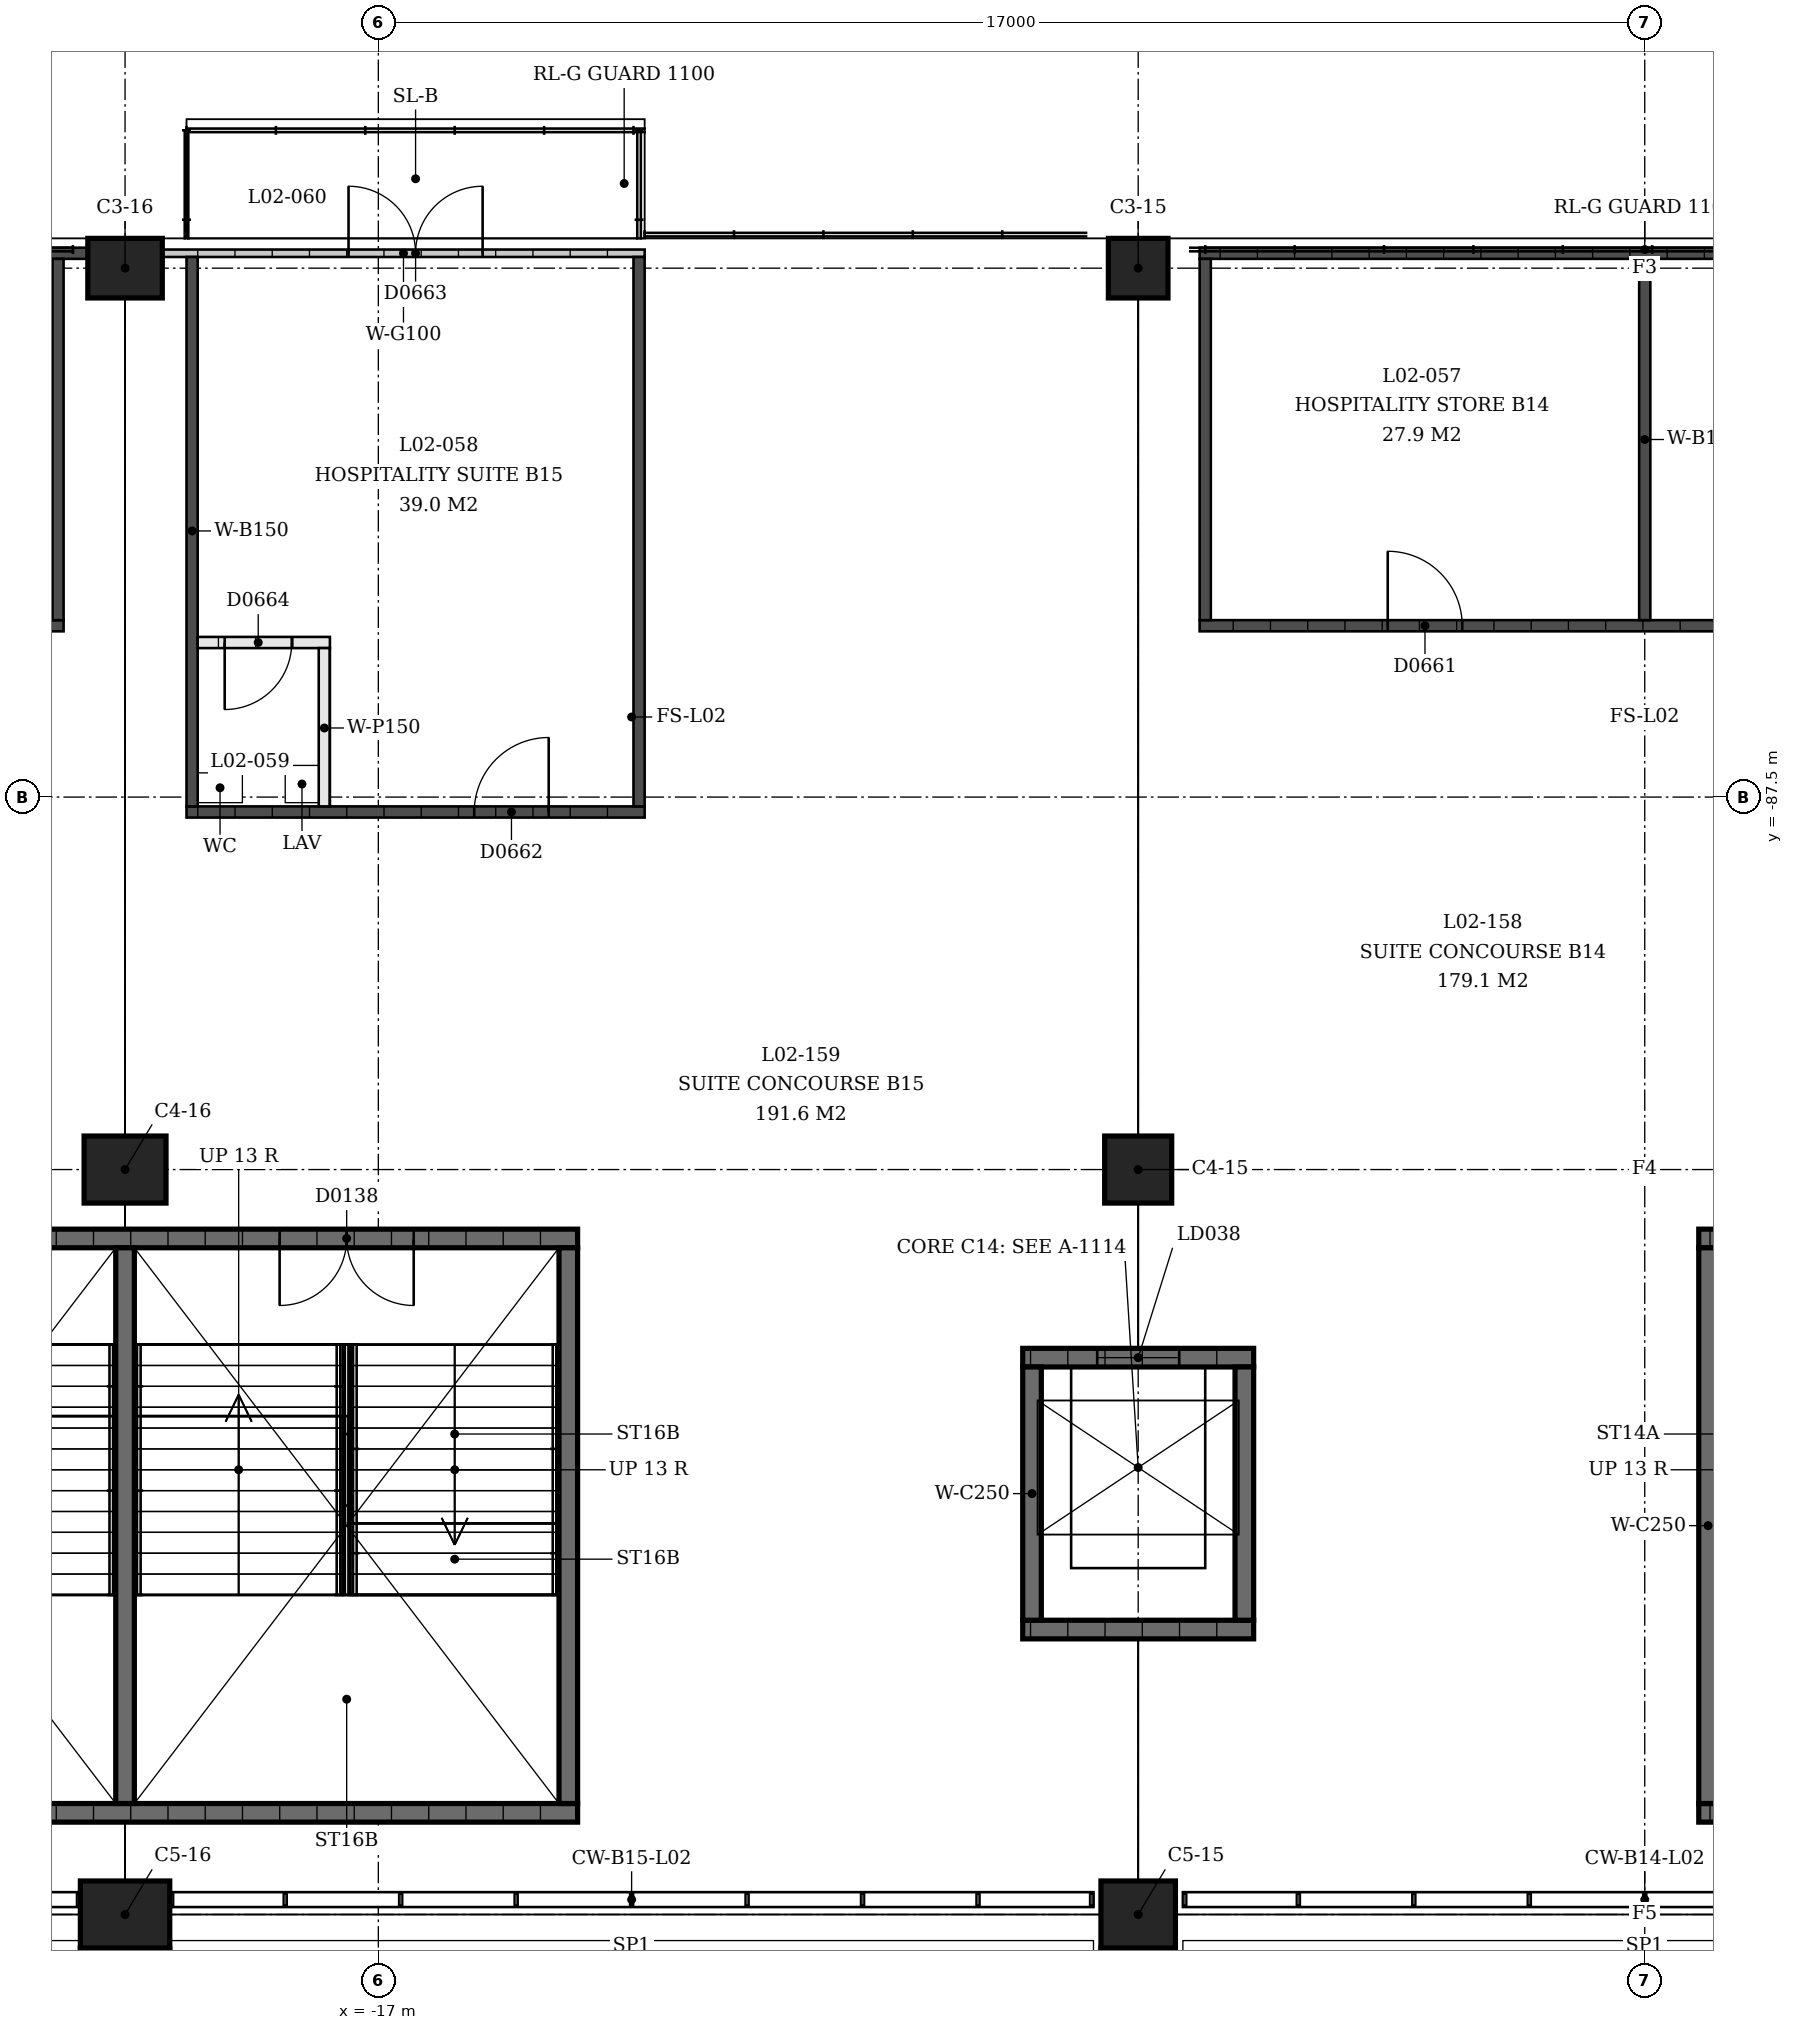
"""IFC4 building model, lengths in metres.
Left out: names, types, materials, properties, quantities, classifications, styles, units other than length and angle.
Written with IfcOpenShell. Run it as: python <this file> out.ifc"""

import sys

from ifc_helpers import new_model, si_unit, direction, frame, frame_2d, origin, origin_2d, place, context, subcontext, project, spatial, rectangle, extrude, element, fill, save


model = new_model("IFC4")
c1 = context("Model", 3, precision=1e-05, world=origin(), true_north=direction((0.0, 1.0)))
c2 = subcontext(c1, "Body", "Model", "MODEL_VIEW")
j1 = project(units=[si_unit("LENGTHUNIT", "METRE"), si_unit("PLANEANGLEUNIT", "RADIAN")], contexts=[c1])
p1 = place(None, origin())
s1 = spatial("IfcSite", under=j1, at=p1, CompositionType="ELEMENT")
p2 = place(p1, origin())
s2 = spatial("IfcBuilding", under=s1, at=p2, CompositionType="ELEMENT")
p3 = place(p2, frame((0.0, 0.0, 9.0)))
s3 = spatial("IfcBuildingStorey", under=s2, at=p3, CompositionType="ELEMENT", Elevation=9.0)
p4 = place(p3, frame((-6.8, -80.4, 0.0), z_axis=(0.0, 0.0, 1.0), x_axis=(1.0, 0.0, 0.0)))
e1 = element("IfcColumn", 1, at=p4, inside=s3, PredefinedType="COLUMN", context=c2, shape_type="SweptSolid", body=[
    extrude(rectangle(XDim=0.8, YDim=0.8, at=origin_2d()), origin(), (0.0, 0.0, 1.0), 4.5),
])
p5 = place(p3, frame((-6.8, -92.5, 0.0), z_axis=(0.0, 0.0, 1.0), x_axis=(1.0, 0.0, 0.0)))
e2 = element("IfcColumn", 2, at=p5, inside=s3, PredefinedType="COLUMN", context=c2, shape_type="SweptSolid", body=[
    extrude(rectangle(XDim=0.9, YDim=0.9, at=origin_2d()), origin(), (0.0, 0.0, 1.0), 4.5),
])
p6 = place(p3, frame((-6.8, -102.5, 0.0), z_axis=(0.0, 0.0, 1.0), x_axis=(1.0, 0.0, 0.0)))
e3 = element("IfcColumn", 3, at=p6, inside=s3, PredefinedType="COLUMN", context=c2, shape_type="SweptSolid", body=[
    extrude(rectangle(XDim=1.0, YDim=0.9, at=origin_2d()), origin(), (0.0, 0.0, 1.0), 4.5),
])
p7 = place(p3, frame((-20.4, -80.4, 0.0), z_axis=(0.0, 0.0, 1.0), x_axis=(1.0, 0.0, 0.0)))
e4 = element("IfcColumn", 4, at=p7, inside=s3, PredefinedType="COLUMN", context=c2, shape_type="SweptSolid", body=[
    extrude(rectangle(XDim=1.0, YDim=0.8, at=origin_2d()), origin(), (0.0, 0.0, 1.0), 4.5),
])
p8 = place(p3, frame((-20.4, -92.5, 0.0), z_axis=(0.0, 0.0, 1.0), x_axis=(1.0, 0.0, 0.0)))
e5 = element("IfcColumn", 5, at=p8, inside=s3, PredefinedType="COLUMN", context=c2, shape_type="SweptSolid", body=[
    extrude(rectangle(XDim=1.1, YDim=0.9, at=origin_2d()), origin(), (0.0, 0.0, 1.0), 4.5),
])
p9 = place(p3, frame((-20.4, -102.5, 0.0), z_axis=(0.0, 0.0, 1.0), x_axis=(1.0, 0.0, 0.0)))
e6 = element("IfcColumn", 6, at=p9, inside=s3, PredefinedType="COLUMN", context=c2, shape_type="SweptSolid", body=[
    extrude(rectangle(XDim=1.2, YDim=0.9, at=origin_2d()), origin(), (0.0, 0.0, 1.0), 4.5),
])
p10 = place(p3, frame((0.725, -93.425, 0.0), z_axis=(0.0, 0.0, 1.0), x_axis=(1.0, 0.0, 0.0)))
e7 = element("IfcWall", 7, at=p10, inside=s3, PredefinedType="SHEAR", context=c2, shape_type="SweptSolid", body=[
    extrude(rectangle(XDim=12.15, YDim=0.25, at=frame_2d((6.075, 0.0))), origin(), (0.0, 0.0, 1.0), 4.09),
])
p11 = place(p10, frame((2.2, 0.0, 0.0)))
e8 = element("IfcOpeningElement", 8, at=p11, cuts=e7, PredefinedType="OPENING", context=c2, shape_type="SweptSolid", body=[
    extrude(rectangle(XDim=1.8, YDim=2.1, at=frame_2d((0.9, 1.05))), frame((0.0, 0.125, 0.0), z_axis=(0.0, -1.0, 0.0), x_axis=(1.0, 0.0, 0.0)), (0.0, 0.0, 1.0), 0.25),
])
p12 = place(p10, frame((8.15, 0.0, 0.0)))
e9 = element("IfcOpeningElement", 9, at=p12, cuts=e7, PredefinedType="OPENING", context=c2, shape_type="SweptSolid", body=[
    extrude(rectangle(XDim=1.8, YDim=2.1, at=frame_2d((0.9, 1.05))), frame((0.0, 0.125, 0.0), z_axis=(0.0, -1.0, 0.0), x_axis=(1.0, 0.0, 0.0)), (0.0, 0.0, 1.0), 0.25),
])
p13 = place(p3, frame((0.725, -101.135, 0.0), z_axis=(0.0, 0.0, 1.0), x_axis=(1.0, 0.0, 0.0)))
e10 = element("IfcWall", 10, at=p13, inside=s3, PredefinedType="SHEAR", context=c2, shape_type="SweptSolid", body=[
    extrude(rectangle(XDim=12.15, YDim=0.25, at=frame_2d((6.075, 0.0))), origin(), (0.0, 0.0, 1.0), 4.09),
])
p14 = place(p3, frame((0.85, -93.55, 0.0), z_axis=(0.0, 0.0, 1.0), x_axis=(0.0, -1.0, 0.0)))
e11 = element("IfcWall", 11, at=p14, inside=s3, PredefinedType="SHEAR", context=c2, shape_type="SweptSolid", body=[
    extrude(rectangle(XDim=7.46, YDim=0.25, at=frame_2d((3.73, 0.0))), origin(), (0.0, 0.0, 1.0), 4.09),
])
p15 = place(p3, frame((-26.475, -93.425, 0.0), z_axis=(0.0, 0.0, 1.0), x_axis=(1.0, 0.0, 0.0)))
e12 = element("IfcWall", 12, at=p15, inside=s3, PredefinedType="SHEAR", context=c2, shape_type="SweptSolid", body=[
    extrude(rectangle(XDim=12.15, YDim=0.25, at=frame_2d((6.075, 0.0))), origin(), (0.0, 0.0, 1.0), 4.09),
])
p16 = place(p15, frame((2.2, 0.0, 0.0)))
e13 = element("IfcOpeningElement", 13, at=p16, cuts=e12, PredefinedType="OPENING", context=c2, shape_type="SweptSolid", body=[
    extrude(rectangle(XDim=1.8, YDim=2.1, at=frame_2d((0.9, 1.05))), frame((0.0, 0.125, 0.0), z_axis=(0.0, -1.0, 0.0), x_axis=(1.0, 0.0, 0.0)), (0.0, 0.0, 1.0), 0.25),
])
p17 = place(p15, frame((8.15, 0.0, 0.0)))
e14 = element("IfcOpeningElement", 14, at=p17, cuts=e12, PredefinedType="OPENING", context=c2, shape_type="SweptSolid", body=[
    extrude(rectangle(XDim=1.8, YDim=2.1, at=frame_2d((0.9, 1.05))), frame((0.0, 0.125, 0.0), z_axis=(0.0, -1.0, 0.0), x_axis=(1.0, 0.0, 0.0)), (0.0, 0.0, 1.0), 0.25),
])
p18 = place(p3, frame((-26.475, -101.135, 0.0), z_axis=(0.0, 0.0, 1.0), x_axis=(1.0, 0.0, 0.0)))
e15 = element("IfcWall", 15, at=p18, inside=s3, PredefinedType="SHEAR", context=c2, shape_type="SweptSolid", body=[
    extrude(rectangle(XDim=12.15, YDim=0.25, at=frame_2d((6.075, 0.0))), origin(), (0.0, 0.0, 1.0), 4.09),
])
for number, where, z_axis, x_axis in (
    (16, (-14.45, -93.55, 0.0), (0.0, 0.0, 1.0), (0.0, -1.0, 0.0)),
    (17, (-20.4, -93.55, 0.0), (0.0, 0.0, 1.0), (0.0, -1.0, 0.0)),
):
    element("IfcWall", number, at=place(p3, frame(where, z_axis=z_axis, x_axis=x_axis)), inside=s3, PredefinedType="SHEAR", context=c2, shape_type="SweptSolid", body=[
        extrude(rectangle(XDim=7.46, YDim=0.25, at=frame_2d((3.73, 0.0))), origin(), (0.0, 0.0, 1.0), 4.09),
    ])
p19 = place(p3, frame((-8.35, -95.025, 0.0), z_axis=(0.0, 0.0, 1.0), x_axis=(1.0, 0.0, 0.0)))
e18 = element("IfcWall", 18, at=p19, inside=s3, PredefinedType="SHEAR", context=c2, shape_type="SweptSolid", body=[
    extrude(rectangle(XDim=3.1, YDim=0.25, at=frame_2d((1.55, 0.0))), origin(), (0.0, 0.0, 1.0), 4.09),
])
p20 = place(p19, frame((1.0, 0.0, 0.0)))
e19 = element("IfcOpeningElement", 19, at=p20, cuts=e18, PredefinedType="OPENING", context=c2, shape_type="SweptSolid", body=[
    extrude(rectangle(XDim=1.1, YDim=2.1, at=frame_2d((0.55, 1.05))), frame((0.0, 0.125, 0.0), z_axis=(0.0, -1.0, 0.0), x_axis=(1.0, 0.0, 0.0)), (0.0, 0.0, 1.0), 0.25),
])
p21 = place(p3, frame((-8.35, -98.675, 0.0), z_axis=(0.0, 0.0, 1.0), x_axis=(1.0, 0.0, 0.0)))
e20 = element("IfcWall", 20, at=p21, inside=s3, PredefinedType="SHEAR", context=c2, shape_type="SweptSolid", body=[
    extrude(rectangle(XDim=3.1, YDim=0.25, at=frame_2d((1.55, 0.0))), origin(), (0.0, 0.0, 1.0), 4.09),
])
for number, where, z_axis, x_axis in (
    (21, (-8.225, -95.15, 0.0), (0.0, 0.0, 1.0), (0.0, -1.0, 0.0)),
    (22, (-5.375, -95.15, 0.0), (0.0, 0.0, 1.0), (0.0, -1.0, 0.0)),
):
    element("IfcWall", number, at=place(p3, frame(where, z_axis=z_axis, x_axis=x_axis)), inside=s3, PredefinedType="SHEAR", context=c2, shape_type="SweptSolid", body=[
        extrude(rectangle(XDim=3.4, YDim=0.25, at=frame_2d((1.7, 0.0))), origin(), (0.0, 0.0, 1.0), 4.09),
    ])
p22 = place(p3, frame((6.3, -80.2, 0.0), z_axis=(0.0, 0.0, 1.0), x_axis=(-1.0, 0.0, 0.0)))
e23 = element("IfcWall", 23, at=p22, inside=s3, PredefinedType="SOLIDWALL", context=c2, shape_type="SweptSolid", body=[
    extrude(rectangle(XDim=12.275, YDim=0.15, at=frame_2d((6.138, 0.0))), origin(), (0.0, 0.0, 1.0), 3.0),
])
p23 = place(p3, frame((5.975, -85.2, 0.0), z_axis=(0.0, 0.0, 1.0), x_axis=(-1.0, 0.0, 0.0)))
e24 = element("IfcWall", 24, at=p23, inside=s3, PredefinedType="SOLIDWALL", context=c2, shape_type="SweptSolid", body=[
    extrude(rectangle(XDim=11.95, YDim=0.15, at=frame_2d((5.975, 0.0))), origin(), (0.0, 0.0, 1.0), 3.0),
])
p24 = place(p23, frame((2.525, 0.0, 0.0)))
e25 = element("IfcOpeningElement", 25, at=p24, cuts=e24, PredefinedType="OPENING", context=c2, shape_type="SweptSolid", body=[
    extrude(rectangle(XDim=1.0, YDim=2.1, at=frame_2d((0.5, 1.05))), frame((0.0, 0.075, 0.0), z_axis=(0.0, -1.0, 0.0), x_axis=(1.0, 0.0, 0.0)), (0.0, 0.0, 1.0), 0.15),
])
p25 = place(p23, frame((8.425, 0.0, 0.0)))
e26 = element("IfcOpeningElement", 26, at=p25, cuts=e24, PredefinedType="OPENING", context=c2, shape_type="SweptSolid", body=[
    extrude(rectangle(XDim=1.0, YDim=2.1, at=frame_2d((0.5, 1.05))), frame((0.0, 0.075, 0.0), z_axis=(0.0, -1.0, 0.0), x_axis=(1.0, 0.0, 0.0)), (0.0, 0.0, 1.0), 0.15),
])
for number, where, z_axis, x_axis in (
    (27, (0.0, -80.275, 0.0), (0.0, 0.0, 1.0), (0.0, -1.0, 0.0)),
    (28, (-5.9, -80.275, 0.0), (0.0, 0.0, 1.0), (0.0, -1.0, 0.0)),
):
    element("IfcWall", number, at=place(p3, frame(where, z_axis=z_axis, x_axis=x_axis)), inside=s3, PredefinedType="SOLIDWALL", context=c2, shape_type="SweptSolid", body=[
        extrude(rectangle(XDim=4.85, YDim=0.15, at=frame_2d((2.425, 0.0))), origin(), (0.0, 0.0, 1.0), 3.0),
    ])
p26 = place(p3, frame((-19.9, -80.2, 0.0), z_axis=(0.0, 0.0, 1.0), x_axis=(1.0, 0.0, 0.0)))
e29 = element("IfcWall", 29, at=p26, inside=s3, PredefinedType="PARTITIONING", context=c2, shape_type="SweptSolid", body=[
    extrude(rectangle(XDim=6.475, YDim=0.1, at=frame_2d((3.237, 0.0))), origin(), (0.0, 0.0, 1.0), 3.0),
])
p27 = place(p26, frame((2.5, 0.0, 0.0)))
e30 = element("IfcOpeningElement", 30, at=p27, cuts=e29, PredefinedType="OPENING", context=c2, shape_type="SweptSolid", body=[
    extrude(rectangle(XDim=1.8, YDim=2.1, at=frame_2d((0.9, 1.05))), frame((0.0, 0.05, 0.0), z_axis=(0.0, -1.0, 0.0), x_axis=(1.0, 0.0, 0.0)), (0.0, 0.0, 1.0), 0.1),
])
p28 = place(p3, frame((-19.575, -87.7, 0.0), z_axis=(0.0, 0.0, 1.0), x_axis=(1.0, 0.0, 0.0)))
e31 = element("IfcWall", 31, at=p28, inside=s3, PredefinedType="SOLIDWALL", context=c2, shape_type="SweptSolid", body=[
    extrude(rectangle(XDim=6.15, YDim=0.15, at=frame_2d((3.075, 0.0))), origin(), (0.0, 0.0, 1.0), 3.0),
])
p29 = place(p28, frame((3.862, 0.0, 0.0)))
e32 = element("IfcOpeningElement", 32, at=p29, cuts=e31, PredefinedType="OPENING", context=c2, shape_type="SweptSolid", body=[
    extrude(rectangle(XDim=1.0, YDim=2.1, at=frame_2d((0.5, 1.05))), frame((0.0, 0.075, 0.0), z_axis=(0.0, -1.0, 0.0), x_axis=(1.0, 0.0, 0.0)), (0.0, 0.0, 1.0), 0.15),
])
for number, where, z_axis, x_axis in (
    (33, (-19.5, -80.25, 0.0), (0.0, 0.0, 1.0), (0.0, -1.0, 0.0)),
    (34, (-13.5, -80.25, 0.0), (0.0, 0.0, 1.0), (0.0, -1.0, 0.0)),
):
    element("IfcWall", number, at=place(p3, frame(where, z_axis=z_axis, x_axis=x_axis)), inside=s3, PredefinedType="SOLIDWALL", context=c2, shape_type="SweptSolid", body=[
        extrude(rectangle(XDim=7.375, YDim=0.15, at=frame_2d((3.688, 0.0))), origin(), (0.0, 0.0, 1.0), 3.0),
    ])
p30 = place(p3, frame((-19.425, -85.425, 0.0), z_axis=(0.0, 0.0, 1.0), x_axis=(1.0, 0.0, 0.0)))
e35 = element("IfcWall", 35, at=p30, inside=s3, PredefinedType="PARTITIONING", context=c2, shape_type="SweptSolid", body=[
    extrude(rectangle(XDim=1.775, YDim=0.15, at=frame_2d((0.888, 0.0))), origin(), (0.0, 0.0, 1.0), 3.0),
])
p31 = place(p30, frame((0.363, 0.0, 0.0)))
e36 = element("IfcOpeningElement", 36, at=p31, cuts=e35, PredefinedType="OPENING", context=c2, shape_type="SweptSolid", body=[
    extrude(rectangle(XDim=0.9, YDim=2.1, at=frame_2d((0.45, 1.05))), frame((0.0, 0.075, 0.0), z_axis=(0.0, -1.0, 0.0), x_axis=(1.0, 0.0, 0.0)), (0.0, 0.0, 1.0), 0.15),
])
p32 = place(p3, frame((-17.725, -85.5, 0.0), z_axis=(0.0, 0.0, 1.0), x_axis=(0.0, -1.0, 0.0)))
e37 = element("IfcWall", 37, at=p32, inside=s3, PredefinedType="PARTITIONING", context=c2, shape_type="SweptSolid", body=[
    extrude(rectangle(XDim=2.125, YDim=0.15, at=frame_2d((1.062, 0.0))), origin(), (0.0, 0.0, 1.0), 3.0),
])
p33 = place(p3, frame((-20.9, -80.2, 0.0), z_axis=(0.0, 0.0, 1.0), x_axis=(-1.0, 0.0, 0.0)))
e38 = element("IfcWall", 38, at=p33, inside=s3, PredefinedType="SOLIDWALL", context=c2, shape_type="SweptSolid", body=[
    extrude(rectangle(XDim=12.275, YDim=0.15, at=frame_2d((6.138, 0.0))), origin(), (0.0, 0.0, 1.0), 3.0),
])
p34 = place(p3, frame((-21.225, -85.2, 0.0), z_axis=(0.0, 0.0, 1.0), x_axis=(-1.0, 0.0, 0.0)))
e39 = element("IfcWall", 39, at=p34, inside=s3, PredefinedType="SOLIDWALL", context=c2, shape_type="SweptSolid", body=[
    extrude(rectangle(XDim=11.95, YDim=0.15, at=frame_2d((5.975, 0.0))), origin(), (0.0, 0.0, 1.0), 3.0),
])
p35 = place(p34, frame((2.525, 0.0, 0.0)))
e40 = element("IfcOpeningElement", 40, at=p35, cuts=e39, PredefinedType="OPENING", context=c2, shape_type="SweptSolid", body=[
    extrude(rectangle(XDim=1.0, YDim=2.1, at=frame_2d((0.5, 1.05))), frame((0.0, 0.075, 0.0), z_axis=(0.0, -1.0, 0.0), x_axis=(1.0, 0.0, 0.0)), (0.0, 0.0, 1.0), 0.15),
])
p36 = place(p34, frame((8.425, 0.0, 0.0)))
e41 = element("IfcOpeningElement", 41, at=p36, cuts=e39, PredefinedType="OPENING", context=c2, shape_type="SweptSolid", body=[
    extrude(rectangle(XDim=1.0, YDim=2.1, at=frame_2d((0.5, 1.05))), frame((0.0, 0.075, 0.0), z_axis=(0.0, -1.0, 0.0), x_axis=(1.0, 0.0, 0.0)), (0.0, 0.0, 1.0), 0.15),
])
p37 = place(p3, frame((-21.3, -80.275, 0.0), z_axis=(0.0, 0.0, 1.0), x_axis=(0.0, -1.0, 0.0)))
e42 = element("IfcWall", 42, at=p37, inside=s3, PredefinedType="SOLIDWALL", context=c2, shape_type="SweptSolid", body=[
    extrude(rectangle(XDim=4.85, YDim=0.15, at=frame_2d((2.425, 0.0))), origin(), (0.0, 0.0, 1.0), 3.0),
])
p38 = place(p17, origin())
e43 = element("IfcDoor", 43, at=p38, inside=s3, OperationType="DOUBLE_DOOR_SINGLE_SWING", PredefinedType="DOOR", context=c2, shape_type="SweptSolid", body=[
    extrude(rectangle(XDim=1.8, YDim=2.1, at=frame_2d((0.9, 1.05))), frame((0.0, 0.025, 0.0), z_axis=(0.0, -1.0, 0.0), x_axis=(1.0, 0.0, 0.0)), (0.0, 0.0, 1.0), 0.05),
])
fill(e14, e43)
p39 = place(p20, origin())
e44 = element("IfcDoor", 44, at=p39, inside=s3, OperationType="SLIDING_TO_LEFT", PredefinedType="DOOR", context=c2, shape_type="SweptSolid", body=[
    extrude(rectangle(XDim=1.1, YDim=2.1, at=frame_2d((0.55, 1.05))), frame((0.0, 0.025, 0.0), z_axis=(0.0, -1.0, 0.0), x_axis=(1.0, 0.0, 0.0)), (0.0, 0.0, 1.0), 0.05),
])
fill(e19, e44)
p40 = place(p25, origin())
e45 = element("IfcDoor", 45, at=p40, inside=s3, OperationType="SINGLE_SWING_RIGHT", PredefinedType="DOOR", context=c2, shape_type="SweptSolid", body=[
    extrude(rectangle(XDim=1.0, YDim=2.1, at=frame_2d((0.5, 1.05))), frame((0.0, 0.025, 0.0), z_axis=(0.0, -1.0, 0.0), x_axis=(1.0, 0.0, 0.0)), (0.0, 0.0, 1.0), 0.05),
])
fill(e26, e45)
p41 = place(p29, origin())
e46 = element("IfcDoor", 46, at=p41, inside=s3, OperationType="SINGLE_SWING_LEFT", PredefinedType="DOOR", context=c2, shape_type="SweptSolid", body=[
    extrude(rectangle(XDim=1.0, YDim=2.1, at=frame_2d((0.5, 1.05))), frame((0.0, 0.025, 0.0), z_axis=(0.0, -1.0, 0.0), x_axis=(1.0, 0.0, 0.0)), (0.0, 0.0, 1.0), 0.05),
])
fill(e32, e46)
p42 = place(p27, origin())
e47 = element("IfcDoor", 47, at=p42, inside=s3, OperationType="DOUBLE_DOOR_SINGLE_SWING", PredefinedType="DOOR", context=c2, shape_type="SweptSolid", body=[
    extrude(rectangle(XDim=1.8, YDim=2.1, at=frame_2d((0.9, 1.05))), frame((0.0, 0.025, 0.0), z_axis=(0.0, -1.0, 0.0), x_axis=(1.0, 0.0, 0.0)), (0.0, 0.0, 1.0), 0.05),
])
fill(e30, e47)
p43 = place(p31, origin())
e48 = element("IfcDoor", 48, at=p43, inside=s3, OperationType="SINGLE_SWING_LEFT", PredefinedType="DOOR", context=c2, shape_type="SweptSolid", body=[
    extrude(rectangle(XDim=0.9, YDim=2.1, at=frame_2d((0.45, 1.05))), frame((0.0, 0.025, 0.0), z_axis=(0.0, -1.0, 0.0), x_axis=(1.0, 0.0, 0.0)), (0.0, 0.0, 1.0), 0.05),
])
fill(e36, e48)
save(model, sys.argv[1])
